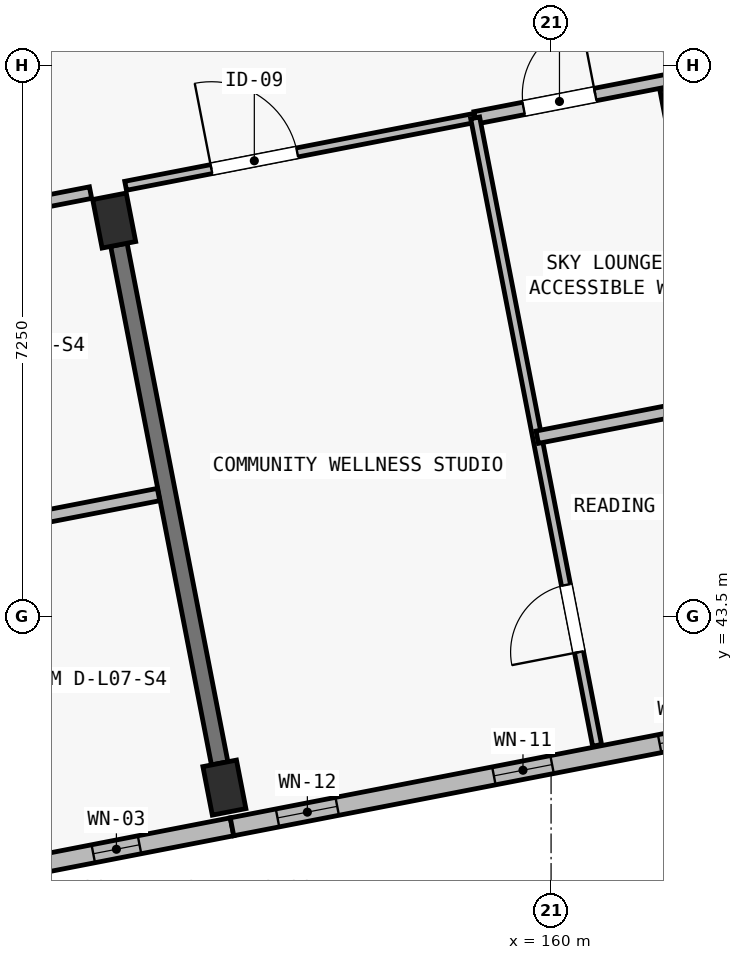
"""IFC4 building model, lengths in metres.
Left out: names, types, materials, properties, quantities, classifications, styles, units other than length and angle.
Written with IfcOpenShell. Run it as: python <this file> out.ifc"""

import sys

from ifc_helpers import new_model, si_unit, direction, frame, frame_2d, origin, origin_2d, place, context, subcontext, project, spatial, rectangle, extrude, element, fill, save


model = new_model("IFC4")
c1 = context("Model", 3, precision=1e-05, world=origin(), true_north=direction((0.0, 1.0)))
c2 = subcontext(c1, "Body", "Model", "MODEL_VIEW")
j1 = project(units=[si_unit("LENGTHUNIT", "METRE"), si_unit("PLANEANGLEUNIT", "RADIAN")], contexts=[c1])
p1 = place(None, origin())
s1 = spatial("IfcSite", under=j1, at=p1, CompositionType="ELEMENT")
p2 = place(p1, origin())
s2 = spatial("IfcBuilding", under=s1, at=p2, CompositionType="ELEMENT")
p3 = place(p2, frame((0.0, 0.0, 24.65)))
s3 = spatial("IfcBuildingStorey", under=s2, at=p3, CompositionType="ELEMENT", Elevation=24.65)
for number, where, z_axis, x_axis in (
    (1, (155.702, 41.251, 0.0), (0.0, 0.0, 1.0), (0.982, 0.191, 0.0)),
    (2, (154.252, 48.711, 0.0), (0.0, 0.0, 1.0), (0.982, 0.191, 0.0)),
    (3, (161.712, 50.161, 0.0), (0.0, 0.0, 1.0), (0.982, 0.191, 0.0)),
):
    element("IfcColumn", number, at=place(p3, frame(where, z_axis=z_axis, x_axis=x_axis)), inside=s3, PredefinedType="COLUMN", context=c2, shape_type="SweptSolid", body=[
        extrude(rectangle(XDim=0.45, YDim=0.65, at=origin_2d()), origin(), (0.0, 0.0, 1.0), 3.25),
    ])
p4 = place(p3, frame((155.64, 41.57, 0.0), z_axis=(0.0, 0.0, 1.0), x_axis=(-0.190817005532, 0.981625626397, 0.0)))
e4 = element("IfcWall", 4, at=p4, inside=s3, PredefinedType="SHEAR", context=c2, shape_type="SweptSolid", body=[
    extrude(rectangle(XDim=6.95, YDim=0.22, at=frame_2d((3.475, 0.0))), origin(), (0.0, 0.0, 1.0), 2.5),
])
p5 = place(p3, frame((155.802, 40.735, 0.0), z_axis=(0.0, 0.0, 1.0), x_axis=(-0.981626422232, -0.190812911449, 0.0)))
e5 = element("IfcWall", 5, at=p5, inside=s3, PredefinedType="SOLIDWALL", context=c2, shape_type="SweptSolid", body=[
    extrude(rectangle(XDim=7.6, YDim=0.24, at=frame_2d((3.8, 0.0))), origin(), (0.0, 0.0, 1.0), 3.0),
])
p6 = place(p5, frame((1.24, 0.0, 0.52)))
e6 = element("IfcOpeningElement", 6, at=p6, cuts=e5, PredefinedType="OPENING", context=c2, shape_type="SweptSolid", body=[
    extrude(rectangle(XDim=0.62, YDim=2.28, at=frame_2d((0.31, 1.14))), frame((0.0, 0.135, 0.0), z_axis=(0.0, -1.0, 0.0), x_axis=(1.0, 0.0, 0.0)), (0.0, 0.0, 1.0), 0.27),
])
p7 = place(p5, frame((5.864, 0.0, 0.52)))
e7 = element("IfcOpeningElement", 7, at=p7, cuts=e5, PredefinedType="OPENING", context=c2, shape_type="SweptSolid", body=[
    extrude(rectangle(XDim=0.68, YDim=2.24, at=frame_2d((0.34, 1.12))), frame((0.0, 0.135, 0.0), z_axis=(0.0, -1.0, 0.0), x_axis=(1.0, 0.0, 0.0)), (0.0, 0.0, 1.0), 0.27),
])
p8 = place(p3, frame((163.778, 42.286, 0.0), z_axis=(0.0, 0.0, 1.0), x_axis=(-0.981628367112, -0.190802905848, 0.0)))
e8 = element("IfcWall", 8, at=p8, inside=s3, PredefinedType="SOLIDWALL", context=c2, shape_type="SweptSolid", body=[
    extrude(rectangle(XDim=8.125, YDim=0.24, at=frame_2d((4.062, 0.0))), origin(), (0.0, 0.0, 1.0), 3.0),
])
p9 = place(p8, frame((1.673, 0.0, 0.42)))
e9 = element("IfcOpeningElement", 9, at=p9, cuts=e8, PredefinedType="OPENING", context=c2, shape_type="SweptSolid", body=[
    extrude(rectangle(XDim=0.72, YDim=2.16, at=frame_2d((0.36, 1.08))), frame((0.0, 0.135, 0.0), z_axis=(0.0, -1.0, 0.0), x_axis=(1.0, 0.0, 0.0)), (0.0, 0.0, 1.0), 0.27),
])
p10 = place(p8, frame((3.835, 0.0, 0.42)))
e10 = element("IfcOpeningElement", 10, at=p10, cuts=e8, PredefinedType="OPENING", context=c2, shape_type="SweptSolid", body=[
    extrude(rectangle(XDim=0.78, YDim=2.2, at=frame_2d((0.39, 1.1))), frame((0.0, 0.135, 0.0), z_axis=(0.0, -1.0, 0.0), x_axis=(1.0, 0.0, 0.0)), (0.0, 0.0, 1.0), 0.27),
])
p11 = place(p8, frame((6.715, 0.0, 0.48)))
e11 = element("IfcOpeningElement", 11, at=p11, cuts=e8, PredefinedType="OPENING", context=c2, shape_type="SweptSolid", body=[
    extrude(rectangle(XDim=0.8, YDim=2.3, at=frame_2d((0.4, 1.15))), frame((0.0, 0.135, 0.0), z_axis=(0.0, -1.0, 0.0), x_axis=(1.0, 0.0, 0.0)), (0.0, 0.0, 1.0), 0.27),
])
p12 = place(p3, frame((159.837, 62.556, 0.0), z_axis=(0.0, 0.0, 1.0), x_axis=(0.389225507936, -0.921142499276, 0.0)))
e12 = element("IfcWall", 12, at=p12, inside=s3, PredefinedType="SOLIDWALL", context=c2, shape_type="SweptSolid", body=[
    extrude(rectangle(XDim=17.91, YDim=0.26, at=frame_2d((8.955, 0.0))), origin(), (0.0, 0.0, 1.0), 3.0),
])
p13 = place(p12, frame((2.99, 0.0, 0.52)))
e13 = element("IfcOpeningElement", 13, at=p13, cuts=e12, PredefinedType="OPENING", context=c2, shape_type="SweptSolid", body=[
    extrude(rectangle(XDim=0.66, YDim=2.32, at=frame_2d((0.33, 1.16))), frame((0.0, 0.145, 0.0), z_axis=(0.0, -1.0, 0.0), x_axis=(1.0, 0.0, 0.0)), (0.0, 0.0, 1.0), 0.29),
])
p14 = place(p12, frame((14.48, 0.0, 0.45)))
e14 = element("IfcOpeningElement", 14, at=p14, cuts=e12, PredefinedType="OPENING", context=c2, shape_type="SweptSolid", body=[
    extrude(rectangle(XDim=0.8, YDim=2.3, at=frame_2d((0.4, 1.15))), frame((0.0, 0.145, 0.0), z_axis=(0.0, -1.0, 0.0), x_axis=(1.0, 0.0, 0.0)), (0.0, 0.0, 1.0), 0.29),
])
p15 = place(p3, frame((161.648, 50.49, 0.0), z_axis=(0.0, 0.0, 1.0), x_axis=(-0.190789073686, 0.981631055622, 0.0)))
e15 = element("IfcWall", 15, at=p15, inside=s3, PredefinedType="PARTITIONING", context=c2, shape_type="SweptSolid", body=[
    extrude(rectangle(XDim=3.73, YDim=0.12, at=frame_2d((1.865, 0.0))), origin(), (0.0, 0.0, 1.0), 2.5),
])
p16 = place(p15, frame((1.35, 0.0, 0.0)))
e16 = element("IfcOpeningElement", 16, at=p16, cuts=e15, PredefinedType="OPENING", context=c2, shape_type="SweptSolid", body=[
    extrude(rectangle(XDim=0.88, YDim=2.1, at=frame_2d((0.44, 1.05))), frame((0.0, 0.075, 0.0), z_axis=(0.0, -1.0, 0.0), x_axis=(1.0, 0.0, 0.0)), (0.0, 0.0, 1.0), 0.15),
])
p17 = place(p3, frame((146.942, 47.718, 0.0), z_axis=(0.0, 0.0, 1.0), x_axis=(0.981623942594, 0.190825667367, 0.0)))
e17 = element("IfcWall", 17, at=p17, inside=s3, PredefinedType="PARTITIONING", context=c2, shape_type="SweptSolid", body=[
    extrude(rectangle(XDim=7.13, YDim=0.155, at=frame_2d((3.565, 0.0))), origin(), (0.0, 0.0, 1.0), 2.97),
])
p18 = place(p17, frame((1.355, 0.0, 0.0)))
e18 = element("IfcOpeningElement", 18, at=p18, cuts=e17, PredefinedType="OPENING", context=c2, shape_type="SweptSolid", body=[
    extrude(rectangle(XDim=0.98, YDim=2.15, at=frame_2d((0.49, 1.075))), frame((0.0, 0.093, 0.0), z_axis=(0.0, -1.0, 0.0), x_axis=(1.0, 0.0, 0.0)), (0.0, 0.0, 1.0), 0.185),
])
p19 = place(p3, frame((151.218, 44.403, 0.0), z_axis=(0.0, 0.0, 1.0), x_axis=(0.981626422232, 0.190812911449, 0.0)))
e19 = element("IfcWall", 19, at=p19, inside=s3, PredefinedType="PLUMBINGWALL", context=c2, shape_type="SweptSolid", body=[
    extrude(rectangle(XDim=3.685, YDim=0.165, at=frame_2d((1.842, 0.0))), origin(), (0.0, 0.0, 1.0), 2.97),
])
p20 = place(p19, frame((1.3, 0.0, 0.0)))
e20 = element("IfcOpeningElement", 20, at=p20, cuts=e19, PredefinedType="OPENING", context=c2, shape_type="SweptSolid", body=[
    extrude(rectangle(XDim=0.82, YDim=2.08, at=frame_2d((0.41, 1.04))), frame((0.0, 0.097, 0.0), z_axis=(0.0, -1.0, 0.0), x_axis=(1.0, 0.0, 0.0)), (0.0, 0.0, 1.0), 0.195),
])
p21 = place(p3, frame((154.402, 49.168, 0.0), z_axis=(0.0, 0.0, 1.0), x_axis=(0.981622711665, 0.190831999263, 0.0)))
e21 = element("IfcWall", 21, at=p21, inside=s3, PredefinedType="PARTITIONING", context=c2, shape_type="SweptSolid", body=[
    extrude(rectangle(XDim=4.685, YDim=0.12, at=frame_2d((2.343, 0.0))), origin(), (0.0, 0.0, 1.0), 2.97),
])
p22 = place(p21, frame((1.15, 0.0, 0.0)))
e22 = element("IfcOpeningElement", 22, at=p22, cuts=e21, PredefinedType="OPENING", context=c2, shape_type="SweptSolid", body=[
    extrude(rectangle(XDim=1.15, YDim=2.15, at=frame_2d((0.575, 1.075))), frame((0.0, 0.075, 0.0), z_axis=(0.0, -1.0, 0.0), x_axis=(1.0, 0.0, 0.0)), (0.0, 0.0, 1.0), 0.15),
])
p23 = place(p3, frame((159.001, 50.062, 0.0), z_axis=(0.0, 0.0, 1.0), x_axis=(0.981624151626, 0.190824592083, 0.0)))
e23 = element("IfcWall", 23, at=p23, inside=s3, PredefinedType="PLUMBINGWALL", context=c2, shape_type="SweptSolid", body=[
    extrude(rectangle(XDim=2.61, YDim=0.165, at=frame_2d((1.305, 0.0))), origin(), (0.0, 0.0, 1.0), 2.97),
])
p24 = place(p23, frame((0.65, 0.0, 0.0)))
e24 = element("IfcOpeningElement", 24, at=p24, cuts=e23, PredefinedType="OPENING", context=c2, shape_type="SweptSolid", body=[
    extrude(rectangle(XDim=0.96, YDim=2.12, at=frame_2d((0.48, 1.06))), frame((0.0, 0.097, 0.0), z_axis=(0.0, -1.0, 0.0), x_axis=(1.0, 0.0, 0.0)), (0.0, 0.0, 1.0), 0.195),
])
p25 = place(p3, frame((160.606, 41.807, 0.0), z_axis=(0.0, 0.0, 1.0), x_axis=(-0.190809830256, 0.981627021163, 0.0)))
e25 = element("IfcWall", 25, at=p25, inside=s3, PredefinedType="PARTITIONING", context=c2, shape_type="SweptSolid", body=[
    extrude(rectangle(XDim=8.41, YDim=0.12, at=frame_2d((4.205, 0.0))), origin(), (0.0, 0.0, 1.0), 2.97),
])
p26 = place(p25, frame((1.25, 0.0, 0.0)))
e26 = element("IfcOpeningElement", 26, at=p26, cuts=e25, PredefinedType="OPENING", context=c2, shape_type="SweptSolid", body=[
    extrude(rectangle(XDim=0.9, YDim=2.1, at=frame_2d((0.45, 1.05))), frame((0.0, 0.075, 0.0), z_axis=(0.0, -1.0, 0.0), x_axis=(1.0, 0.0, 0.0)), (0.0, 0.0, 1.0), 0.15),
])
p27 = place(p3, frame((159.818, 45.861, 0.0), z_axis=(0.0, 0.0, 1.0), x_axis=(0.981628634101, 0.19080153226, 0.0)))
e27 = element("IfcWall", 27, at=p27, inside=s3, PredefinedType="PLUMBINGWALL", context=c2, shape_type="SweptSolid", body=[
    extrude(rectangle(XDim=2.59, YDim=0.165, at=frame_2d((1.295, 0.0))), origin(), (0.0, 0.0, 1.0), 2.97),
])
p28 = place(p6, origin())
e28 = element("IfcWindow", 28, at=p28, inside=s3, PartitioningType="SINGLE_PANEL", PredefinedType="WINDOW", context=c2, shape_type="SweptSolid", body=[
    extrude(rectangle(XDim=0.62, YDim=2.28, at=frame_2d((0.31, 1.14))), frame((0.0, 0.03, 0.0), z_axis=(0.0, -1.0, 0.0), x_axis=(1.0, 0.0, 0.0)), (0.0, 0.0, 1.0), 0.06),
])
fill(e6, e28)
p29 = place(p9, origin())
e29 = element("IfcWindow", 29, at=p29, inside=s3, PartitioningType="SINGLE_PANEL", PredefinedType="WINDOW", context=c2, shape_type="SweptSolid", body=[
    extrude(rectangle(XDim=0.72, YDim=2.16, at=frame_2d((0.36, 1.08))), frame((0.0, 0.03, 0.0), z_axis=(0.0, -1.0, 0.0), x_axis=(1.0, 0.0, 0.0)), (0.0, 0.0, 1.0), 0.06),
])
fill(e9, e29)
p30 = place(p10, origin())
e30 = element("IfcWindow", 30, at=p30, inside=s3, PartitioningType="SINGLE_PANEL", PredefinedType="WINDOW", context=c2, shape_type="SweptSolid", body=[
    extrude(rectangle(XDim=0.78, YDim=2.2, at=frame_2d((0.39, 1.1))), frame((0.0, 0.03, 0.0), z_axis=(0.0, -1.0, 0.0), x_axis=(1.0, 0.0, 0.0)), (0.0, 0.0, 1.0), 0.06),
])
fill(e10, e30)
p31 = place(p11, origin())
e31 = element("IfcWindow", 31, at=p31, inside=s3, PartitioningType="SINGLE_PANEL", PredefinedType="WINDOW", context=c2, shape_type="SweptSolid", body=[
    extrude(rectangle(XDim=0.8, YDim=2.3, at=frame_2d((0.4, 1.15))), frame((0.0, 0.03, 0.0), z_axis=(0.0, -1.0, 0.0), x_axis=(1.0, 0.0, 0.0)), (0.0, 0.0, 1.0), 0.06),
])
fill(e11, e31)
p32 = place(p22, origin())
e32 = element("IfcDoor", 32, at=p32, inside=s3, OperationType="SINGLE_SWING_LEFT", PredefinedType="DOOR", context=c2, shape_type="SweptSolid", body=[
    extrude(rectangle(XDim=1.15, YDim=2.15, at=frame_2d((0.575, 1.075))), frame((0.0, 0.025, 0.0), z_axis=(0.0, -1.0, 0.0), x_axis=(1.0, 0.0, 0.0)), (0.0, 0.0, 1.0), 0.05),
])
fill(e22, e32)
p33 = place(p24, origin())
e33 = element("IfcDoor", 33, at=p33, inside=s3, OperationType="SINGLE_SWING_RIGHT", PredefinedType="DOOR", context=c2, shape_type="SweptSolid", body=[
    extrude(rectangle(XDim=0.96, YDim=2.12, at=frame_2d((0.48, 1.06))), frame((0.0, 0.025, 0.0), z_axis=(0.0, -1.0, 0.0), x_axis=(1.0, 0.0, 0.0)), (0.0, 0.0, 1.0), 0.05),
])
fill(e24, e33)
p34 = place(p26, origin())
e34 = element("IfcDoor", 34, at=p34, inside=s3, OperationType="SINGLE_SWING_LEFT", PredefinedType="DOOR", context=c2, shape_type="SweptSolid", body=[
    extrude(rectangle(XDim=0.9, YDim=2.1, at=frame_2d((0.45, 1.05))), frame((0.0, 0.025, 0.0), z_axis=(0.0, -1.0, 0.0), x_axis=(1.0, 0.0, 0.0)), (0.0, 0.0, 1.0), 0.05),
])
fill(e26, e34)
save(model, sys.argv[1])
